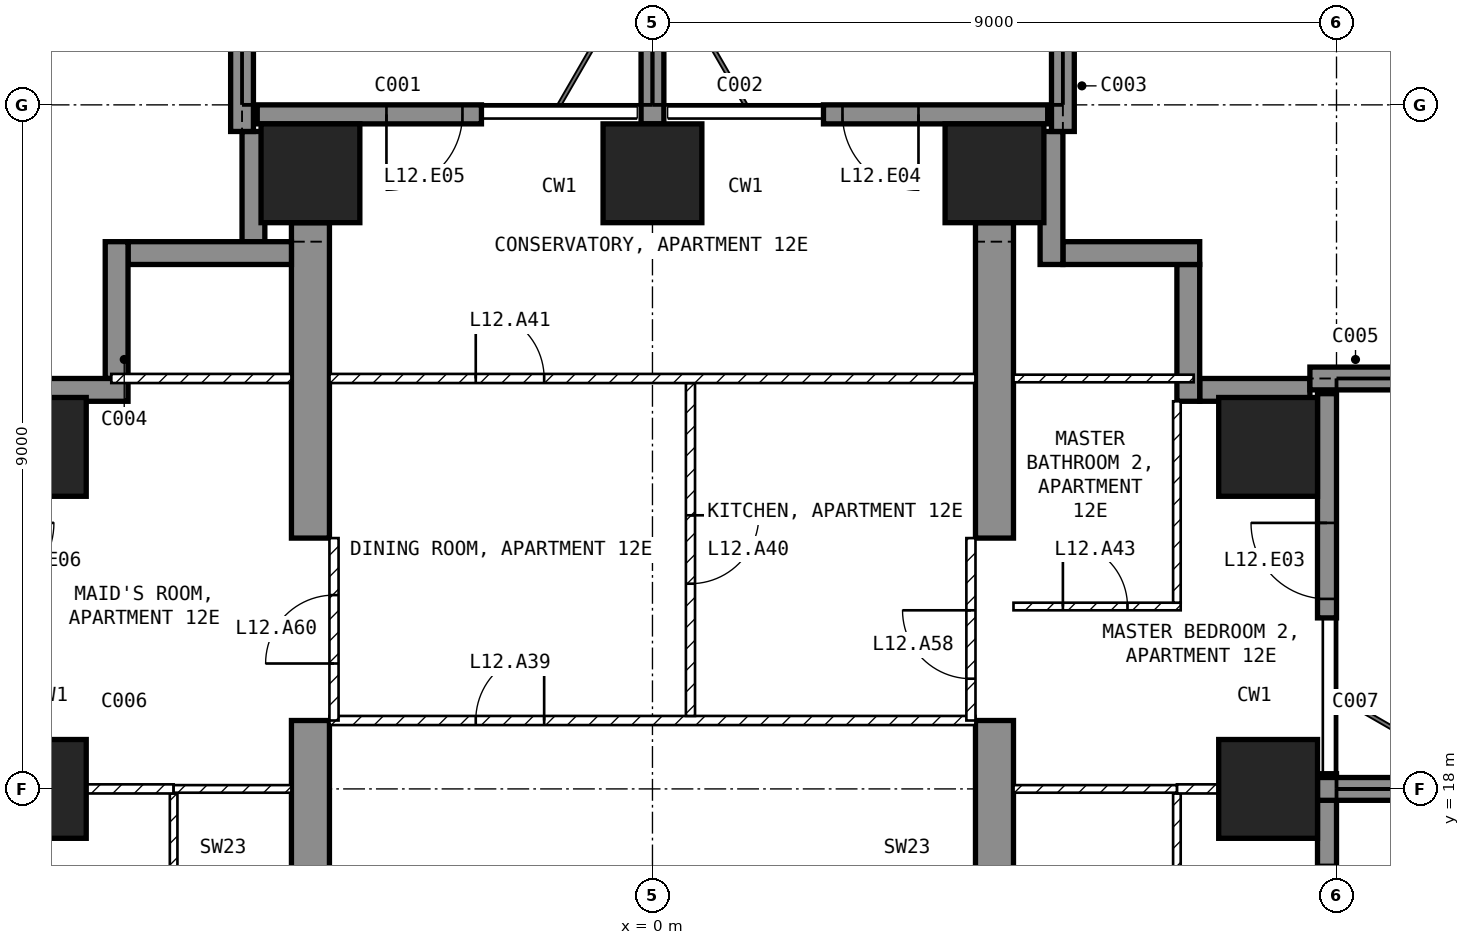
"""IFC4 building model, lengths in metres.
Left out: names, types, materials, properties, quantities, classifications, styles, units other than length and angle.
Written with IfcOpenShell. Run it as: python <this file> out.ifc"""

import sys

from ifc_helpers import new_model, si_unit, direction, frame, frame_2d, origin, origin_2d, place, context, subcontext, project, spatial, polyline, rectangle, outline, extrude, element, fill, save


model = new_model("IFC4")
c1 = context("Model", 3, precision=1e-05, world=origin(), true_north=direction((0.0, 1.0)))
c2 = subcontext(c1, "Body", "Model", "MODEL_VIEW")
j1 = project(units=[si_unit("LENGTHUNIT", "METRE"), si_unit("PLANEANGLEUNIT", "RADIAN")], contexts=[c1])
p1 = place(None, origin())
s1 = spatial("IfcSite", under=j1, at=p1, CompositionType="ELEMENT")
p2 = place(p1, origin())
s2 = spatial("IfcBuilding", under=s1, at=p2, CompositionType="ELEMENT")
p3 = place(p2, frame((0.0, 0.0, 61.0)))
s3 = spatial("IfcBuildingStorey", under=s2, at=p3, CompositionType="ELEMENT", Elevation=61.0)
for number, where, z_axis, x_axis in (
    (1, (-8.1, 18.0, -0.25), (0.0, 0.0, 1.0), (1.0, 0.0, 0.0)),
    (2, (-8.1, 22.5, -0.25), (0.0, 0.0, 1.0), (1.0, 0.0, 0.0)),
    (3, (-4.5, 26.1, -0.25), (0.0, 0.0, 1.0), (1.0, 0.0, 0.0)),
    (4, (0.0, 26.1, -0.25), (0.0, 0.0, 1.0), (1.0, 0.0, 0.0)),
    (5, (4.5, 26.1, -0.25), (0.0, 0.0, 1.0), (1.0, 0.0, 0.0)),
    (6, (8.1, 18.0, -0.25), (0.0, 0.0, 1.0), (1.0, 0.0, 0.0)),
    (7, (8.1, 22.5, -0.25), (0.0, 0.0, 1.0), (1.0, 0.0, 0.0)),
):
    element("IfcColumn", number, at=place(p3, frame(where, z_axis=z_axis, x_axis=x_axis)), inside=s3, PredefinedType="COLUMN", context=c2, shape_type="SweptSolid", body=[
        extrude(rectangle(XDim=1.3, YDim=1.3, at=origin_2d()), origin(), (0.0, 0.0, 1.0), 3.5),
    ])
for number, where, z_axis, x_axis in (
    (8, (-4.75, 9.0, -0.25), (1.0, 0.0, 0.0), (0.0, 1.0, 0.0)),
    (9, (4.25, 9.0, -0.25), (1.0, 0.0, 0.0), (0.0, 1.0, 0.0)),
):
    element("IfcWall", number, at=place(p3, frame(where, z_axis=z_axis, x_axis=x_axis)), inside=s3, PredefinedType="SHEAR", context=c2, shape_type="SweptSolid", body=[
        extrude(outline(polyline([(0.0, 0.0), (2.1, 0.0), (2.1, 2.65), (4.5, 2.65), (4.5, 0.0), (9.9, 0.0), (9.9, 2.65), (12.3, 2.65), (12.3, 0.0), (16.45, 0.0), (16.45, 3.5), (0.0, 3.5), (0.0, 0.0)])), origin(), (0.0, 0.0, 1.0), 0.5),
    ])
p4 = place(p3, frame((8.875, 15.55, 0.0), z_axis=(0.0, 0.0, 1.0), x_axis=(0.0, 1.0, 0.0)))
e10 = element("IfcWall", 10, at=p4, inside=s3, PredefinedType="SOLIDWALL", context=c2, shape_type="SweptSolid", body=[
    extrude(rectangle(XDim=2.65, YDim=0.25, at=frame_2d((1.325, 0.0))), origin(), (0.0, 0.0, 1.0), 3.25),
])
p5 = place(p4, frame((0.25, 0.0, 0.0)))
e11 = element("IfcOpeningElement", 11, at=p5, cuts=e10, PredefinedType="OPENING", context=c2, shape_type="SweptSolid", body=[
    extrude(rectangle(XDim=1.2, YDim=2.4, at=frame_2d((0.6, 1.2))), frame((0.0, 0.135, 0.0), z_axis=(0.0, -1.0, 0.0), x_axis=(1.0, 0.0, 0.0)), (0.0, 0.0, 1.0), 0.27),
])
p6 = place(p3, frame((8.875, 20.25, 0.0), z_axis=(0.0, 0.0, 1.0), x_axis=(0.0, 1.0, 0.0)))
e12 = element("IfcWall", 12, at=p6, inside=s3, PredefinedType="SOLIDWALL", context=c2, shape_type="SweptSolid", body=[
    extrude(rectangle(XDim=2.95, YDim=0.25, at=frame_2d((1.475, 0.0))), origin(), (0.0, 0.0, 1.0), 3.25),
])
p7 = place(p6, frame((0.25, 0.0, 0.0)))
e13 = element("IfcOpeningElement", 13, at=p7, cuts=e12, PredefinedType="OPENING", context=c2, shape_type="SweptSolid", body=[
    extrude(rectangle(XDim=1.0, YDim=2.4, at=frame_2d((0.5, 1.2))), frame((0.0, 0.135, 0.0), z_axis=(0.0, -1.0, 0.0), x_axis=(1.0, 0.0, 0.0)), (0.0, 0.0, 1.0), 0.27),
])
p8 = place(p3, frame((5.2, 26.875, 0.0), z_axis=(0.0, 0.0, 1.0), x_axis=(-1.0, 0.0, 0.0)))
e14 = element("IfcWall", 14, at=p8, inside=s3, PredefinedType="SOLIDWALL", context=c2, shape_type="SweptSolid", body=[
    extrude(rectangle(XDim=2.95, YDim=0.25, at=frame_2d((1.475, 0.0))), origin(), (0.0, 0.0, 1.0), 3.25),
])
p9 = place(p8, frame((1.7, 0.0, 0.0)))
e15 = element("IfcOpeningElement", 15, at=p9, cuts=e14, PredefinedType="OPENING", context=c2, shape_type="SweptSolid", body=[
    extrude(rectangle(XDim=1.0, YDim=2.4, at=frame_2d((0.5, 1.2))), frame((0.0, 0.135, 0.0), z_axis=(0.0, -1.0, 0.0), x_axis=(1.0, 0.0, 0.0)), (0.0, 0.0, 1.0), 0.27),
])
p10 = place(p3, frame((-2.25, 26.875, 0.0), z_axis=(0.0, 0.0, 1.0), x_axis=(-1.0, 0.0, 0.0)))
e16 = element("IfcWall", 16, at=p10, inside=s3, PredefinedType="SOLIDWALL", context=c2, shape_type="SweptSolid", body=[
    extrude(rectangle(XDim=2.95, YDim=0.25, at=frame_2d((1.475, 0.0))), origin(), (0.0, 0.0, 1.0), 3.25),
])
p11 = place(p10, frame((0.25, 0.0, 0.0)))
e17 = element("IfcOpeningElement", 17, at=p11, cuts=e16, PredefinedType="OPENING", context=c2, shape_type="SweptSolid", body=[
    extrude(rectangle(XDim=1.0, YDim=2.4, at=frame_2d((0.5, 1.2))), frame((0.0, 0.135, 0.0), z_axis=(0.0, -1.0, 0.0), x_axis=(1.0, 0.0, 0.0)), (0.0, 0.0, 1.0), 0.27),
])
p12 = place(p3, frame((8.65, 23.25, 0.0), z_axis=(0.0, 0.0, 1.0), x_axis=(-1.0, 0.0, 0.0)))
e18 = element("IfcWall", 18, at=p12, inside=s3, PredefinedType="SOLIDWALL", context=c2, shape_type="SweptSolid", body=[
    extrude(rectangle(XDim=1.45, YDim=0.3, at=frame_2d((0.725, 0.0))), origin(), (0.0, 0.0, 1.0), 3.25),
])
p13 = place(p3, frame((7.05, 23.1, 0.0), z_axis=(0.0, 0.0, 1.0), x_axis=(0.0, 1.0, 0.0)))
e19 = element("IfcWall", 19, at=p13, inside=s3, PredefinedType="SOLIDWALL", context=c2, shape_type="SweptSolid", body=[
    extrude(rectangle(XDim=1.8, YDim=0.3, at=frame_2d((0.9, 0.0))), origin(), (0.0, 0.0, 1.0), 3.25),
])
p14 = place(p3, frame((7.2, 25.05, 0.0), z_axis=(0.0, 0.0, 1.0), x_axis=(-1.0, 0.0, 0.0)))
e20 = element("IfcWall", 20, at=p14, inside=s3, PredefinedType="SOLIDWALL", context=c2, shape_type="SweptSolid", body=[
    extrude(rectangle(XDim=1.8, YDim=0.3, at=frame_2d((0.9, 0.0))), origin(), (0.0, 0.0, 1.0), 3.25),
])
p15 = place(p3, frame((5.25, 24.9, 0.0), z_axis=(0.0, 0.0, 1.0), x_axis=(0.0, 1.0, 0.0)))
e21 = element("IfcWall", 21, at=p15, inside=s3, PredefinedType="SOLIDWALL", context=c2, shape_type="SweptSolid", body=[
    extrude(rectangle(XDim=1.75, YDim=0.3, at=frame_2d((0.875, 0.0))), origin(), (0.0, 0.0, 1.0), 3.25),
])
p16 = place(p3, frame((-5.25, 26.65, 0.0), z_axis=(0.0, 0.0, 1.0), x_axis=(0.0, -1.0, 0.0)))
e22 = element("IfcWall", 22, at=p16, inside=s3, PredefinedType="SOLIDWALL", context=c2, shape_type="SweptSolid", body=[
    extrude(rectangle(XDim=1.45, YDim=0.3, at=frame_2d((0.725, 0.0))), origin(), (0.0, 0.0, 1.0), 3.25),
])
p17 = place(p3, frame((-4.75, 25.05, 0.0), z_axis=(0.0, 0.0, 1.0), x_axis=(-1.0, 0.0, 0.0)))
e23 = element("IfcWall", 23, at=p17, inside=s3, PredefinedType="SOLIDWALL", context=c2, shape_type="SweptSolid", body=[
    extrude(rectangle(XDim=2.15, YDim=0.3, at=frame_2d((1.075, 0.0))), origin(), (0.0, 0.0, 1.0), 3.25),
])
p18 = place(p3, frame((-7.05, 25.2, 0.0), z_axis=(0.0, 0.0, 1.0), x_axis=(0.0, -1.0, 0.0)))
e24 = element("IfcWall", 24, at=p18, inside=s3, PredefinedType="SOLIDWALL", context=c2, shape_type="SweptSolid", body=[
    extrude(rectangle(XDim=1.8, YDim=0.3, at=frame_2d((0.9, 0.0))), origin(), (0.0, 0.0, 1.0), 3.25),
])
p19 = place(p3, frame((-6.9, 23.25, 0.0), z_axis=(0.0, 0.0, 1.0), x_axis=(-1.0, 0.0, 0.0)))
e25 = element("IfcWall", 25, at=p19, inside=s3, PredefinedType="SOLIDWALL", context=c2, shape_type="SweptSolid", body=[
    extrude(rectangle(XDim=1.75, YDim=0.3, at=frame_2d((0.875, 0.0))), origin(), (0.0, 0.0, 1.0), 3.25),
])
p20 = place(p3, frame((-5.4, 26.65, 0.0), z_axis=(0.0, 0.0, 1.0), x_axis=(0.0, 1.0, 0.0)))
e26 = element("IfcWall", 26, at=p20, inside=s3, PredefinedType="SOLIDWALL", context=c2, shape_type="SweptSolid", body=[
    extrude(rectangle(XDim=3.05, YDim=0.3, at=frame_2d((1.525, 0.0))), origin(), (0.0, 0.0, 1.0), 3.25),
])
p21 = place(p3, frame((0.0, 26.75, 0.0), z_axis=(0.0, 0.0, 1.0), x_axis=(0.0, 1.0, 0.0)))
e27 = element("IfcWall", 27, at=p21, inside=s3, PredefinedType="SOLIDWALL", context=c2, shape_type="SweptSolid", body=[
    extrude(rectangle(XDim=2.95, YDim=0.3, at=frame_2d((1.475, 0.0))), origin(), (0.0, 0.0, 1.0), 3.25),
])
p22 = place(p3, frame((5.4, 26.65, 0.0), z_axis=(0.0, 0.0, 1.0), x_axis=(0.0, 1.0, 0.0)))
e28 = element("IfcWall", 28, at=p22, inside=s3, PredefinedType="SOLIDWALL", context=c2, shape_type="SweptSolid", body=[
    extrude(rectangle(XDim=3.05, YDim=0.3, at=frame_2d((1.525, 0.0))), origin(), (0.0, 0.0, 1.0), 3.25),
])
p23 = place(p3, frame((8.75, 18.0, 0.0), z_axis=(0.0, 0.0, 1.0), x_axis=(1.0, 0.0, 0.0)))
e29 = element("IfcWall", 29, at=p23, inside=s3, PredefinedType="SOLIDWALL", context=c2, shape_type="SweptSolid", body=[
    extrude(rectangle(XDim=2.95, YDim=0.3, at=frame_2d((1.475, 0.0))), origin(), (0.0, 0.0, 1.0), 3.25),
])
p24 = place(p3, frame((8.65, 23.4, 0.0), z_axis=(0.0, 0.0, 1.0), x_axis=(1.0, 0.0, 0.0)))
e30 = element("IfcWall", 30, at=p24, inside=s3, PredefinedType="SOLIDWALL", context=c2, shape_type="SweptSolid", body=[
    extrude(rectangle(XDim=3.05, YDim=0.3, at=frame_2d((1.525, 0.0))), origin(), (0.0, 0.0, 1.0), 3.25),
])
p25 = place(p3, frame((-4.25, 18.9, 0.0), z_axis=(0.0, 0.0, 1.0), x_axis=(1.0, 0.0, 0.0)))
e31 = element("IfcWall", 31, at=p25, inside=s3, PredefinedType="PARTITIONING", context=c2, shape_type="SweptSolid", body=[
    extrude(rectangle(XDim=8.5, YDim=0.12, at=frame_2d((4.25, 0.0))), origin(), (0.0, 0.0, 1.0), 3.25),
])
p26 = place(p25, frame((1.925, 0.0, 0.0)))
e32 = element("IfcOpeningElement", 32, at=p26, cuts=e31, PredefinedType="OPENING", context=c2, shape_type="SweptSolid", body=[
    extrude(rectangle(XDim=0.9, YDim=2.1, at=frame_2d((0.45, 1.05))), frame((0.0, 0.07, 0.0), z_axis=(0.0, -1.0, 0.0), x_axis=(1.0, 0.0, 0.0)), (0.0, 0.0, 1.0), 0.14),
])
p27 = place(p3, frame((0.5, 23.34, 0.0), z_axis=(0.0, 0.0, 1.0), x_axis=(0.0, -1.0, 0.0)))
e33 = element("IfcWall", 33, at=p27, inside=s3, PredefinedType="PARTITIONING", context=c2, shape_type="SweptSolid", body=[
    extrude(rectangle(XDim=4.38, YDim=0.12, at=frame_2d((2.19, 0.0))), origin(), (0.0, 0.0, 1.0), 3.25),
])
p28 = place(p27, frame((1.74, 0.0, 0.0)))
e34 = element("IfcOpeningElement", 34, at=p28, cuts=e33, PredefinedType="OPENING", context=c2, shape_type="SweptSolid", body=[
    extrude(rectangle(XDim=0.9, YDim=2.1, at=frame_2d((0.45, 1.05))), frame((0.0, 0.07, 0.0), z_axis=(0.0, -1.0, 0.0), x_axis=(1.0, 0.0, 0.0)), (0.0, 0.0, 1.0), 0.14),
])
p29 = place(p3, frame((-4.25, 23.4, 0.0), z_axis=(0.0, 0.0, 1.0), x_axis=(1.0, 0.0, 0.0)))
e35 = element("IfcWall", 35, at=p29, inside=s3, PredefinedType="PARTITIONING", context=c2, shape_type="SweptSolid", body=[
    extrude(rectangle(XDim=8.5, YDim=0.12, at=frame_2d((4.25, 0.0))), origin(), (0.0, 0.0, 1.0), 3.25),
])
p30 = place(p29, frame((1.925, 0.0, 0.0)))
e36 = element("IfcOpeningElement", 36, at=p30, cuts=e35, PredefinedType="OPENING", context=c2, shape_type="SweptSolid", body=[
    extrude(rectangle(XDim=0.9, YDim=2.1, at=frame_2d((0.45, 1.05))), frame((0.0, 0.07, 0.0), z_axis=(0.0, -1.0, 0.0), x_axis=(1.0, 0.0, 0.0)), (0.0, 0.0, 1.0), 0.14),
])
p31 = place(p3, frame((6.9, 14.45, 0.0), z_axis=(0.0, 0.0, 1.0), x_axis=(0.0, 1.0, 0.0)))
e37 = element("IfcWall", 37, at=p31, inside=s3, PredefinedType="PARTITIONING", context=c2, shape_type="SweptSolid", body=[
    extrude(rectangle(XDim=3.49, YDim=0.1, at=frame_2d((1.745, 0.0))), origin(), (0.0, 0.0, 1.0), 3.25),
])
p32 = place(p3, frame((6.9, 18.0, 0.0), z_axis=(0.0, 0.0, 1.0), x_axis=(1.0, 0.0, 0.0)))
e38 = element("IfcWall", 38, at=p32, inside=s3, PredefinedType="PARTITIONING", context=c2, shape_type="SweptSolid", body=[
    extrude(rectangle(XDim=0.55, YDim=0.12, at=frame_2d((0.275, 0.0))), origin(), (0.0, 0.0, 1.0), 2.346),
])
p33 = place(p3, frame((4.75, 18.0, 0.0), z_axis=(0.0, 0.0, 1.0), x_axis=(1.0, 0.0, 0.0)))
e39 = element("IfcWall", 39, at=p33, inside=s3, PredefinedType="PARTITIONING", context=c2, shape_type="SweptSolid", body=[
    extrude(rectangle(XDim=2.15, YDim=0.1, at=frame_2d((1.075, 0.0))), origin(), (0.0, 0.0, 1.0), 2.346),
])
p34 = place(p3, frame((4.75, 20.4, 0.0), z_axis=(0.0, 0.0, 1.0), x_axis=(1.0, 0.0, 0.0)))
e40 = element("IfcWall", 40, at=p34, inside=s3, PredefinedType="PARTITIONING", context=c2, shape_type="SweptSolid", body=[
    extrude(rectangle(XDim=2.2, YDim=0.1, at=frame_2d((1.1, 0.0))), origin(), (0.0, 0.0, 1.0), 3.25),
])
p35 = place(p34, frame((0.65, 0.0, 0.0)))
e41 = element("IfcOpeningElement", 41, at=p35, cuts=e40, PredefinedType="OPENING", context=c2, shape_type="SweptSolid", body=[
    extrude(rectangle(XDim=0.85, YDim=2.1, at=frame_2d((0.425, 1.05))), frame((0.0, 0.06, 0.0), z_axis=(0.0, -1.0, 0.0), x_axis=(1.0, 0.0, 0.0)), (0.0, 0.0, 1.0), 0.12),
])
p36 = place(p3, frame((6.9, 20.45, 0.0), z_axis=(0.0, 0.0, 1.0), x_axis=(0.0, 1.0, 0.0)))
e42 = element("IfcWall", 42, at=p36, inside=s3, PredefinedType="PARTITIONING", context=c2, shape_type="SweptSolid", body=[
    extrude(rectangle(XDim=2.65, YDim=0.1, at=frame_2d((1.325, 0.0))), origin(), (0.0, 0.0, 1.0), 3.25),
])
p37 = place(p3, frame((4.75, 23.4, 0.0), z_axis=(0.0, 0.0, 1.0), x_axis=(1.0, 0.0, 0.0)))
e43 = element("IfcWall", 43, at=p37, inside=s3, PredefinedType="PARTITIONING", context=c2, shape_type="SweptSolid", body=[
    extrude(rectangle(XDim=2.37, YDim=0.1, at=frame_2d((1.185, 0.0))), origin(), (0.0, 0.0, 1.0), 3.25),
])
p38 = place(p3, frame((-6.3, 17.94, 0.0), z_axis=(0.0, 0.0, 1.0), x_axis=(0.0, -1.0, 0.0)))
e44 = element("IfcWall", 44, at=p38, inside=s3, PredefinedType="PARTITIONING", context=c2, shape_type="SweptSolid", body=[
    extrude(rectangle(XDim=3.49, YDim=0.1, at=frame_2d((1.745, 0.0))), origin(), (0.0, 0.0, 1.0), 3.25),
])
p39 = place(p38, frame((1.32, 0.0, 0.0)))
e45 = element("IfcOpeningElement", 45, at=p39, cuts=e44, PredefinedType="OPENING", context=c2, shape_type="SweptSolid", body=[
    extrude(rectangle(XDim=0.85, YDim=2.1, at=frame_2d((0.425, 1.05))), frame((0.0, 0.06, 0.0), z_axis=(0.0, -1.0, 0.0), x_axis=(1.0, 0.0, 0.0)), (0.0, 0.0, 1.0), 0.12),
])
p40 = place(p3, frame((-7.45, 18.0, 0.0), z_axis=(0.0, 0.0, 1.0), x_axis=(1.0, 0.0, 0.0)))
e46 = element("IfcWall", 46, at=p40, inside=s3, PredefinedType="PARTITIONING", context=c2, shape_type="SweptSolid", body=[
    extrude(rectangle(XDim=1.15, YDim=0.12, at=frame_2d((0.575, 0.0))), origin(), (0.0, 0.0, 1.0), 2.346),
])
p41 = place(p3, frame((-6.3, 18.0, 0.0), z_axis=(0.0, 0.0, 1.0), x_axis=(1.0, 0.0, 0.0)))
e47 = element("IfcWall", 47, at=p41, inside=s3, PredefinedType="PARTITIONING", context=c2, shape_type="SweptSolid", body=[
    extrude(rectangle(XDim=1.55, YDim=0.1, at=frame_2d((0.775, 0.0))), origin(), (0.0, 0.0, 1.0), 2.346),
])
p42 = place(p3, frame((-7.12, 23.4, 0.0), z_axis=(0.0, 0.0, 1.0), x_axis=(1.0, 0.0, 0.0)))
e48 = element("IfcWall", 48, at=p42, inside=s3, PredefinedType="PARTITIONING", context=c2, shape_type="SweptSolid", body=[
    extrude(rectangle(XDim=2.37, YDim=0.12, at=frame_2d((1.185, 0.0))), origin(), (0.0, 0.0, 1.0), 3.25),
])
p43 = place(p3, frame((4.19, 18.9, 0.0), z_axis=(0.0, 0.0, 1.0), x_axis=(0.0, 1.0, 0.0)))
e49 = element("IfcWall", 49, at=p43, inside=s3, PredefinedType="PARTITIONING", context=c2, shape_type="SweptSolid", body=[
    extrude(rectangle(XDim=2.4, YDim=0.12, at=frame_2d((1.2, 0.0))), origin(), (0.0, 0.0, 1.0), 2.4),
])
p44 = place(p43, frame((0.55, 0.0, 0.0)))
e50 = element("IfcOpeningElement", 50, at=p44, cuts=e49, PredefinedType="OPENING", context=c2, shape_type="SweptSolid", body=[
    extrude(rectangle(XDim=0.9, YDim=2.1, at=frame_2d((0.45, 1.05))), frame((0.0, 0.07, 0.0), z_axis=(0.0, -1.0, 0.0), x_axis=(1.0, 0.0, 0.0)), (0.0, 0.0, 1.0), 0.14),
])
p45 = place(p3, frame((-4.19, 18.9, 0.0), z_axis=(0.0, 0.0, 1.0), x_axis=(0.0, 1.0, 0.0)))
e51 = element("IfcWall", 51, at=p45, inside=s3, PredefinedType="PARTITIONING", context=c2, shape_type="SweptSolid", body=[
    extrude(rectangle(XDim=2.4, YDim=0.12, at=frame_2d((1.2, 0.0))), origin(), (0.0, 0.0, 1.0), 2.4),
])
p46 = place(p45, frame((0.75, 0.0, 0.0)))
e52 = element("IfcOpeningElement", 52, at=p46, cuts=e51, PredefinedType="OPENING", context=c2, shape_type="SweptSolid", body=[
    extrude(rectangle(XDim=0.9, YDim=2.1, at=frame_2d((0.45, 1.05))), frame((0.0, 0.07, 0.0), z_axis=(0.0, -1.0, 0.0), x_axis=(1.0, 0.0, 0.0)), (0.0, 0.0, 1.0), 0.14),
])
p47 = place(p5, origin())
e53 = element("IfcDoor", 53, at=p47, inside=s3, OperationType="SINGLE_SWING_LEFT", PredefinedType="DOOR", context=c2, shape_type="SweptSolid", body=[
    extrude(rectangle(XDim=1.2, YDim=2.4, at=frame_2d((0.6, 1.2))), frame((0.0, 0.025, 0.0), z_axis=(0.0, -1.0, 0.0), x_axis=(1.0, 0.0, 0.0)), (0.0, 0.0, 1.0), 0.05),
])
fill(e11, e53)
p48 = place(p7, origin())
e54 = element("IfcDoor", 54, at=p48, inside=s3, OperationType="SINGLE_SWING_RIGHT", PredefinedType="DOOR", context=c2, shape_type="SweptSolid", body=[
    extrude(rectangle(XDim=1.0, YDim=2.4, at=frame_2d((0.5, 1.2))), frame((0.0, 0.025, 0.0), z_axis=(0.0, -1.0, 0.0), x_axis=(1.0, 0.0, 0.0)), (0.0, 0.0, 1.0), 0.05),
])
fill(e13, e54)
p49 = place(p9, origin())
e55 = element("IfcDoor", 55, at=p49, inside=s3, OperationType="SINGLE_SWING_LEFT", PredefinedType="DOOR", context=c2, shape_type="SweptSolid", body=[
    extrude(rectangle(XDim=1.0, YDim=2.4, at=frame_2d((0.5, 1.2))), frame((0.0, 0.025, 0.0), z_axis=(0.0, -1.0, 0.0), x_axis=(1.0, 0.0, 0.0)), (0.0, 0.0, 1.0), 0.05),
])
fill(e15, e55)
p50 = place(p11, origin())
e56 = element("IfcDoor", 56, at=p50, inside=s3, OperationType="SINGLE_SWING_RIGHT", PredefinedType="DOOR", context=c2, shape_type="SweptSolid", body=[
    extrude(rectangle(XDim=1.0, YDim=2.4, at=frame_2d((0.5, 1.2))), frame((0.0, 0.025, 0.0), z_axis=(0.0, -1.0, 0.0), x_axis=(1.0, 0.0, 0.0)), (0.0, 0.0, 1.0), 0.05),
])
fill(e17, e56)
p51 = place(p26, origin())
e57 = element("IfcDoor", 57, at=p51, inside=s3, OperationType="SINGLE_SWING_RIGHT", PredefinedType="DOOR", context=c2, shape_type="SweptSolid", body=[
    extrude(rectangle(XDim=0.9, YDim=2.1, at=frame_2d((0.45, 1.05))), frame((0.0, 0.025, 0.0), z_axis=(0.0, -1.0, 0.0), x_axis=(1.0, 0.0, 0.0)), (0.0, 0.0, 1.0), 0.05),
])
fill(e32, e57)
p52 = place(p28, origin())
e58 = element("IfcDoor", 58, at=p52, inside=s3, OperationType="SINGLE_SWING_LEFT", PredefinedType="DOOR", context=c2, shape_type="SweptSolid", body=[
    extrude(rectangle(XDim=0.9, YDim=2.1, at=frame_2d((0.45, 1.05))), frame((0.0, 0.025, 0.0), z_axis=(0.0, -1.0, 0.0), x_axis=(1.0, 0.0, 0.0)), (0.0, 0.0, 1.0), 0.05),
])
fill(e34, e58)
p53 = place(p30, origin())
e59 = element("IfcDoor", 59, at=p53, inside=s3, OperationType="SINGLE_SWING_LEFT", PredefinedType="DOOR", context=c2, shape_type="SweptSolid", body=[
    extrude(rectangle(XDim=0.9, YDim=2.1, at=frame_2d((0.45, 1.05))), frame((0.0, 0.025, 0.0), z_axis=(0.0, -1.0, 0.0), x_axis=(1.0, 0.0, 0.0)), (0.0, 0.0, 1.0), 0.05),
])
fill(e36, e59)
p54 = place(p35, origin())
e60 = element("IfcDoor", 60, at=p54, inside=s3, OperationType="SINGLE_SWING_LEFT", PredefinedType="DOOR", context=c2, shape_type="SweptSolid", body=[
    extrude(rectangle(XDim=0.85, YDim=2.1, at=frame_2d((0.425, 1.05))), frame((0.0, 0.025, 0.0), z_axis=(0.0, -1.0, 0.0), x_axis=(1.0, 0.0, 0.0)), (0.0, 0.0, 1.0), 0.05),
])
fill(e41, e60)
p55 = place(p44, origin())
e61 = element("IfcDoor", 61, at=p55, inside=s3, OperationType="SINGLE_SWING_RIGHT", PredefinedType="DOOR", context=c2, shape_type="SweptSolid", body=[
    extrude(rectangle(XDim=0.9, YDim=2.1, at=frame_2d((0.45, 1.05))), frame((0.0, 0.025, 0.0), z_axis=(0.0, -1.0, 0.0), x_axis=(1.0, 0.0, 0.0)), (0.0, 0.0, 1.0), 0.05),
])
fill(e50, e61)
p56 = place(p46, origin())
e62 = element("IfcDoor", 62, at=p56, inside=s3, OperationType="SINGLE_SWING_LEFT", PredefinedType="DOOR", context=c2, shape_type="SweptSolid", body=[
    extrude(rectangle(XDim=0.9, YDim=2.1, at=frame_2d((0.45, 1.05))), frame((0.0, 0.025, 0.0), z_axis=(0.0, -1.0, 0.0), x_axis=(1.0, 0.0, 0.0)), (0.0, 0.0, 1.0), 0.05),
])
fill(e52, e62)
save(model, sys.argv[1])
